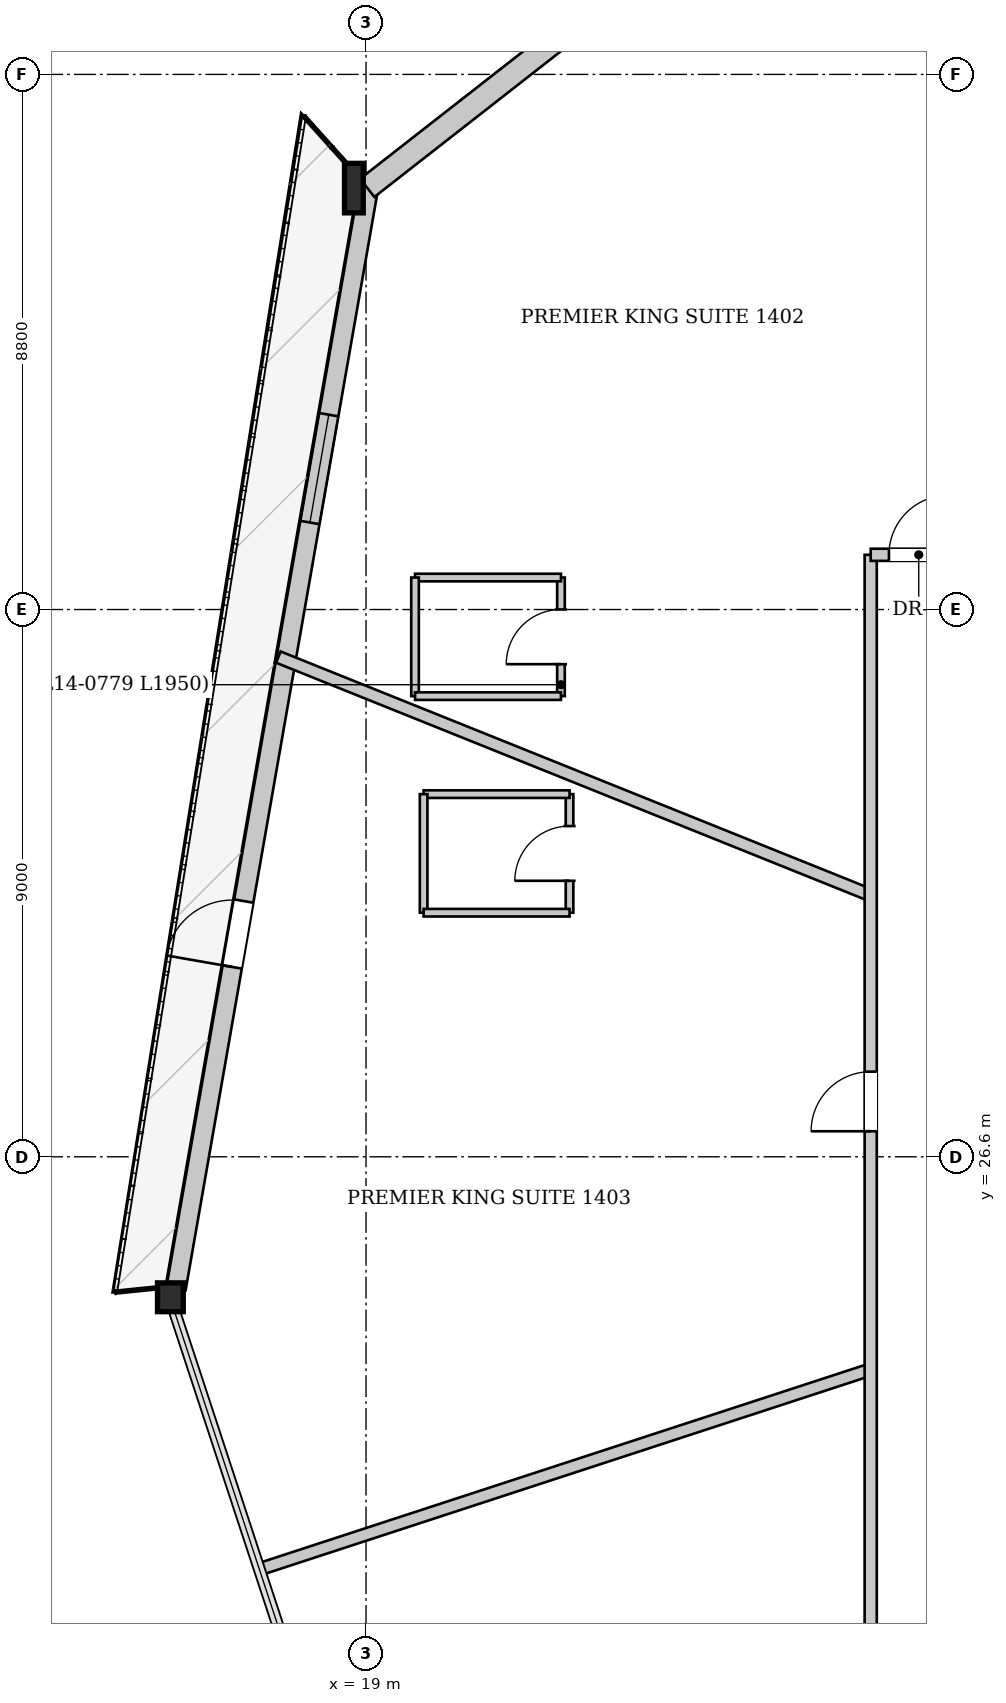
"""IFC4 building model, lengths in metres.
Left out: names, types, materials, properties, quantities, classifications, styles, units other than length and angle.
Written with IfcOpenShell. Run it as: python <this file> out.ifc"""

import sys

from ifc_helpers import new_model, si_unit, direction, frame, frame_2d, origin, origin_2d, place, context, subcontext, project, spatial, rectangle, i_section, extrude, source, transform, mapped, element, fill, save


model = new_model("IFC4")
c1 = context("Model", 3, precision=1e-05, world=origin(), true_north=direction((0.0, 1.0)))
c2 = subcontext(c1, "Body", "Model", "MODEL_VIEW")
j1 = project(units=[si_unit("LENGTHUNIT", "METRE"), si_unit("PLANEANGLEUNIT", "RADIAN")], contexts=[c1])
p1 = place(None, origin())
s1 = spatial("IfcSite", under=j1, at=p1, CompositionType="ELEMENT")
p2 = place(p1, origin())
s2 = spatial("IfcBuilding", under=s1, at=p2, CompositionType="ELEMENT")
p3 = place(p2, frame((0.0, 0.0, 57.7)))
s3 = spatial("IfcBuildingStorey", under=s2, at=p3, CompositionType="ELEMENT", Elevation=57.7)
m1 = source(origin(), c2, "Body", "SweptSolid", [
    extrude(i_section(OverallWidth=0.308, OverallDepth=0.814, WebThickness=0.021, FlangeThickness=0.04, at=origin_2d()), origin(), (0.0, 0.0, 1.0), 3.405),
])
p4 = place(p3, frame((18.903, 42.684, 0.0), z_axis=(-0.060441534737, -0.090124566031, 0.994094755784), x_axis=(0.830522417348, -0.556985201133, 0.0)))
e1 = element("IfcColumn", 1, at=p4, inside=s3, PredefinedType="COLUMN", context=c2, shape_type="MappedRepresentation", body=[
    mapped(m1, transform((0.0, 0.0, 0.0), x_axis=(1.0, 0.0, 0.0), y_axis=(0.0, 1.0, 0.0), z_axis=(0.0, 0.0, 1.0), scale=1.0)),
])
m2 = source(origin(), c2, "Body", "SweptSolid", [
    extrude(i_section(OverallWidth=0.424, OverallDepth=0.474, WebThickness=0.043, FlangeThickness=0.068, at=origin_2d()), origin(), (0.0, 0.0, 1.0), 3.405),
])
p5 = place(p3, frame((15.717, 24.46, 0.0), z_axis=(0.038221610545, -0.099892501857, 0.994263846552), x_axis=(0.933966291378, 0.357361115078, 0.0)))
e2 = element("IfcColumn", 2, at=p5, inside=s3, PredefinedType="COLUMN", context=c2, shape_type="MappedRepresentation", body=[
    mapped(m2, transform((0.0, 0.0, 0.0), x_axis=(1.0, 0.0, 0.0), y_axis=(0.0, 1.0, 0.0), z_axis=(0.0, 0.0, 1.0), scale=1.0)),
])
p6 = place(p3, frame((15.875, 24.432, 0.0), z_axis=(0.0, 0.0, 1.0), x_axis=(0.172204905353, 0.985061150677, 0.0)))
e3 = element("IfcWall", 3, at=p6, inside=s3, PredefinedType="SOLIDWALL", context=c2, shape_type="SweptSolid", body=[
    extrude(rectangle(XDim=18.5, YDim=0.32, at=frame_2d((9.25, 0.0))), origin(), (0.0, 0.0, 1.0), 2.592),
])
p7 = place(p6, frame((5.37, 0.0, 0.0)))
e4 = element("IfcOpeningElement", 4, at=p7, cuts=e3, PredefinedType="OPENING", context=c2, shape_type="SweptSolid", body=[
    extrude(rectangle(XDim=1.1, YDim=2.3, at=frame_2d((0.55, 1.15))), frame((0.0, 0.17, 0.0), z_axis=(0.0, -1.0, 0.0), x_axis=(1.0, 0.0, 0.0)), (0.0, 0.0, 1.0), 0.34),
])
p8 = place(p6, frame((12.79, 0.0, 0.272)))
e5 = element("IfcOpeningElement", 5, at=p8, cuts=e3, PredefinedType="OPENING", context=c2, shape_type="SweptSolid", body=[
    extrude(rectangle(XDim=1.8, YDim=2.2, at=frame_2d((0.9, 1.1))), frame((0.0, 0.17, 0.0), z_axis=(0.0, -1.0, 0.0), x_axis=(1.0, 0.0, 0.0)), (0.0, 0.0, 1.0), 0.34),
])
p9 = place(p3, frame((19.02, 42.534, 0.0), z_axis=(0.0, 0.0, 1.0), x_axis=(0.787974703517, 0.615707614552, 0.0)))
e6 = element("IfcWall", 6, at=p9, inside=s3, PredefinedType="SOLIDWALL", context=c2, shape_type="SweptSolid", body=[
    extrude(rectangle(XDim=6.26, YDim=0.38, at=frame_2d((3.13, 0.0))), origin(), (0.0, 0.0, 1.0), 2.592),
])
p10 = place(p3, frame((27.3, 30.901, 0.0), z_axis=(0.0, 0.0, 1.0), x_axis=(-0.927840286719, 0.372977750463, 0.0)))
e7 = element("IfcWall", 7, at=p10, inside=s3, PredefinedType="PARTITIONING", context=c2, shape_type="SweptSolid", body=[
    extrude(rectangle(XDim=10.499, YDim=0.2, at=frame_2d((5.25, 0.0))), origin(), (0.0, 0.0, 1.0), 3.3),
])
p11 = place(p3, frame((27.3, 23.103, 0.0), z_axis=(0.0, 0.0, 1.0), x_axis=(-0.95051188869, -0.310688186867, 0.0)))
e8 = element("IfcWall", 8, at=p11, inside=s3, PredefinedType="PARTITIONING", context=c2, shape_type="SweptSolid", body=[
    extrude(rectangle(XDim=10.548, YDim=0.2, at=frame_2d((5.274, 0.0))), origin(), (0.0, 0.0, 1.0), 3.3),
])
p12 = place(p3, frame((22.206, 34.176, 0.0), z_axis=(0.0, 0.0, 1.0), x_axis=(0.0, 1.0, 0.0)))
e9 = element("IfcWall", 9, at=p12, inside=s3, PredefinedType="PARTITIONING", context=c2, shape_type="SweptSolid", body=[
    extrude(rectangle(XDim=1.95, YDim=0.125, at=frame_2d((0.975, 0.0))), origin(), (0.0, 0.0, 1.0), 2.925),
])
p13 = place(p12, frame((0.525, 0.0, 0.0)))
e10 = element("IfcOpeningElement", 10, at=p13, cuts=e9, PredefinedType="OPENING", context=c2, shape_type="SweptSolid", body=[
    extrude(rectangle(XDim=0.9, YDim=2.1, at=frame_2d((0.45, 1.05))), frame((0.0, 0.073, 0.0), z_axis=(0.0, -1.0, 0.0), x_axis=(1.0, 0.0, 0.0)), (0.0, 0.0, 1.0), 0.145),
])
p14 = place(p3, frame((22.206, 36.126, 0.0), z_axis=(0.0, 0.0, 1.0), x_axis=(-1.0, 0.0, 0.0)))
e11 = element("IfcWall", 11, at=p14, inside=s3, PredefinedType="PARTITIONING", context=c2, shape_type="SweptSolid", body=[
    extrude(rectangle(XDim=2.4, YDim=0.125, at=frame_2d((1.2, 0.0))), origin(), (0.0, 0.0, 1.0), 3.3),
])
p15 = place(p3, frame((19.806, 36.126, 0.0), z_axis=(0.0, 0.0, 1.0), x_axis=(0.0, -1.0, 0.0)))
e12 = element("IfcWall", 12, at=p15, inside=s3, PredefinedType="PARTITIONING", context=c2, shape_type="SweptSolid", body=[
    extrude(rectangle(XDim=1.95, YDim=0.125, at=frame_2d((0.975, 0.0))), origin(), (0.0, 0.0, 1.0), 3.3),
])
p16 = place(p3, frame((19.806, 34.176, 0.0), z_axis=(0.0, 0.0, 1.0), x_axis=(1.0, 0.0, 0.0)))
e13 = element("IfcWall", 13, at=p16, inside=s3, PredefinedType="PARTITIONING", context=c2, shape_type="SweptSolid", body=[
    extrude(rectangle(XDim=2.4, YDim=0.125, at=frame_2d((1.2, 0.0))), origin(), (0.0, 0.0, 1.0), 3.3),
])
p17 = place(p3, frame((22.347, 30.614, 0.0), z_axis=(0.0, 0.0, 1.0), x_axis=(0.0, 1.0, 0.0)))
e14 = element("IfcWall", 14, at=p17, inside=s3, PredefinedType="PARTITIONING", context=c2, shape_type="SweptSolid", body=[
    extrude(rectangle(XDim=1.95, YDim=0.125, at=frame_2d((0.975, 0.0))), origin(), (0.0, 0.0, 1.0), 2.925),
])
p18 = place(p17, frame((0.525, 0.0, 0.0)))
e15 = element("IfcOpeningElement", 15, at=p18, cuts=e14, PredefinedType="OPENING", context=c2, shape_type="SweptSolid", body=[
    extrude(rectangle(XDim=0.9, YDim=2.1, at=frame_2d((0.45, 1.05))), frame((0.0, 0.073, 0.0), z_axis=(0.0, -1.0, 0.0), x_axis=(1.0, 0.0, 0.0)), (0.0, 0.0, 1.0), 0.145),
])
p19 = place(p3, frame((22.347, 32.564, 0.0), z_axis=(0.0, 0.0, 1.0), x_axis=(-1.0, 0.0, 0.0)))
e16 = element("IfcWall", 16, at=p19, inside=s3, PredefinedType="PARTITIONING", context=c2, shape_type="SweptSolid", body=[
    extrude(rectangle(XDim=2.4, YDim=0.125, at=frame_2d((1.2, 0.0))), origin(), (0.0, 0.0, 1.0), 3.3),
])
p20 = place(p3, frame((19.947, 32.564, 0.0), z_axis=(0.0, 0.0, 1.0), x_axis=(0.0, -1.0, 0.0)))
e17 = element("IfcWall", 17, at=p20, inside=s3, PredefinedType="PARTITIONING", context=c2, shape_type="SweptSolid", body=[
    extrude(rectangle(XDim=1.95, YDim=0.125, at=frame_2d((0.975, 0.0))), origin(), (0.0, 0.0, 1.0), 3.3),
])
p21 = place(p3, frame((19.947, 30.614, 0.0), z_axis=(0.0, 0.0, 1.0), x_axis=(1.0, 0.0, 0.0)))
e18 = element("IfcWall", 18, at=p21, inside=s3, PredefinedType="PARTITIONING", context=c2, shape_type="SweptSolid", body=[
    extrude(rectangle(XDim=2.4, YDim=0.125, at=frame_2d((1.2, 0.0))), origin(), (0.0, 0.0, 1.0), 3.3),
])
p22 = place(p3, frame((27.3, 16.7, 0.0), z_axis=(0.0, 0.0, 1.0), x_axis=(0.0, 1.0, 0.0)))
e19 = element("IfcWall", 19, at=p22, inside=s3, PredefinedType="PARTITIONING", context=c2, shape_type="SweptSolid", body=[
    extrude(rectangle(XDim=19.8, YDim=0.2, at=frame_2d((9.9, 0.0))), origin(), (0.0, 0.0, 1.0), 3.3),
])
p23 = place(p22, frame((10.32, 0.0, 0.0)))
e20 = element("IfcOpeningElement", 20, at=p23, cuts=e19, PredefinedType="OPENING", context=c2, shape_type="SweptSolid", body=[
    extrude(rectangle(XDim=0.98, YDim=2.15, at=frame_2d((0.49, 1.075))), frame((0.0, 0.11, 0.0), z_axis=(0.0, -1.0, 0.0), x_axis=(1.0, 0.0, 0.0)), (0.0, 0.0, 1.0), 0.22),
])
p24 = place(p3, frame((27.3, 36.5, 0.0), z_axis=(0.0, 0.0, 1.0), x_axis=(1.0, 0.0, 0.0)))
e21 = element("IfcWall", 21, at=p24, inside=s3, PredefinedType="PARTITIONING", context=c2, shape_type="SweptSolid", body=[
    extrude(rectangle(XDim=21.4, YDim=0.2, at=frame_2d((10.7, 0.0))), origin(), (0.0, 0.0, 1.0), 3.3),
])
p25 = place(p24, frame((20.12, 0.0, 0.0)))
e22 = element("IfcOpeningElement", 22, at=p25, cuts=e21, PredefinedType="OPENING", context=c2, shape_type="SweptSolid", body=[
    extrude(rectangle(XDim=0.98, YDim=2.15, at=frame_2d((0.49, 1.075))), frame((0.0, 0.11, 0.0), z_axis=(0.0, -1.0, 0.0), x_axis=(1.0, 0.0, 0.0)), (0.0, 0.0, 1.0), 0.22),
])
p26 = place(p24, frame((0.3, 0.0, 0.0)))
e23 = element("IfcOpeningElement", 23, at=p26, cuts=e21, PredefinedType="OPENING", context=c2, shape_type="SweptSolid", body=[
    extrude(rectangle(XDim=0.98, YDim=2.15, at=frame_2d((0.49, 1.075))), frame((0.0, 0.11, 0.0), z_axis=(0.0, -1.0, 0.0), x_axis=(1.0, 0.0, 0.0)), (0.0, 0.0, 1.0), 0.22),
])
m3 = source(origin(), c2, "Body", "SweptSolid", [
    extrude(rectangle(XDim=1.1, YDim=2.3, at=frame_2d((0.55, 1.15))), frame((0.0, 0.025, 0.0), z_axis=(0.0, -1.0, 0.0), x_axis=(1.0, 0.0, 0.0)), (0.0, 0.0, 1.0), 0.05),
])
p27 = place(p7, origin())
e24 = element("IfcDoor", 24, at=p27, inside=s3, OperationType="SINGLE_SWING_LEFT", PredefinedType="DOOR", context=c2, shape_type="MappedRepresentation", body=[
    mapped(m3, transform((0.0, 0.0, 0.0), x_axis=(1.0, 0.0, 0.0), y_axis=(0.0, 1.0, 0.0), z_axis=(0.0, 0.0, 1.0), scale=1.0)),
])
fill(e4, e24)
m4 = source(origin(), c2, "Body", "SweptSolid", [
    extrude(rectangle(XDim=1.8, YDim=2.2, at=frame_2d((0.9, 1.1))), frame((0.0, 0.03, 0.0), z_axis=(0.0, -1.0, 0.0), x_axis=(1.0, 0.0, 0.0)), (0.0, 0.0, 1.0), 0.06),
])
p28 = place(p8, origin())
e25 = element("IfcWindow", 25, at=p28, inside=s3, PartitioningType="SINGLE_PANEL", PredefinedType="WINDOW", context=c2, shape_type="MappedRepresentation", body=[
    mapped(m4, transform((0.0, 0.0, 0.0), x_axis=(1.0, 0.0, 0.0), y_axis=(0.0, 1.0, 0.0), z_axis=(0.0, 0.0, 1.0), scale=1.0)),
])
fill(e5, e25)
m5 = source(origin(), c2, "Body", "SweptSolid", [
    extrude(rectangle(XDim=0.9, YDim=2.1, at=frame_2d((0.45, 1.05))), frame((0.0, 0.025, 0.0), z_axis=(0.0, -1.0, 0.0), x_axis=(1.0, 0.0, 0.0)), (0.0, 0.0, 1.0), 0.05),
])
p29 = place(p13, origin())
e26 = element("IfcDoor", 26, at=p29, inside=s3, OperationType="SINGLE_SWING_LEFT", PredefinedType="DOOR", context=c2, shape_type="MappedRepresentation", body=[
    mapped(m5, transform((0.0, 0.0, 0.0), x_axis=(1.0, 0.0, 0.0), y_axis=(0.0, 1.0, 0.0), z_axis=(0.0, 0.0, 1.0), scale=1.0)),
])
fill(e10, e26)
p30 = place(p18, origin())
e27 = element("IfcDoor", 27, at=p30, inside=s3, OperationType="SINGLE_SWING_LEFT", PredefinedType="DOOR", context=c2, shape_type="MappedRepresentation", body=[
    mapped(m5, transform((0.0, 0.0, 0.0), x_axis=(1.0, 0.0, 0.0), y_axis=(0.0, 1.0, 0.0), z_axis=(0.0, 0.0, 1.0), scale=1.0)),
])
fill(e15, e27)
m6 = source(origin(), c2, "Body", "SweptSolid", [
    extrude(rectangle(XDim=0.98, YDim=2.15, at=frame_2d((0.49, 1.075))), frame((0.0, 0.025, 0.0), z_axis=(0.0, -1.0, 0.0), x_axis=(1.0, 0.0, 0.0)), (0.0, 0.0, 1.0), 0.05),
])
p31 = place(p23, origin())
e28 = element("IfcDoor", 28, at=p31, inside=s3, OperationType="SINGLE_SWING_LEFT", PredefinedType="DOOR", context=c2, shape_type="MappedRepresentation", body=[
    mapped(m6, transform((0.0, 0.0, 0.0), x_axis=(1.0, 0.0, 0.0), y_axis=(0.0, 1.0, 0.0), z_axis=(0.0, 0.0, 1.0), scale=1.0)),
])
fill(e20, e28)
p32 = place(p26, origin())
e29 = element("IfcDoor", 29, at=p32, inside=s3, OperationType="SINGLE_SWING_RIGHT", PredefinedType="DOOR", context=c2, shape_type="MappedRepresentation", body=[
    mapped(m6, transform((0.0, 0.0, 0.0), x_axis=(1.0, 0.0, 0.0), y_axis=(0.0, 1.0, 0.0), z_axis=(0.0, 0.0, 1.0), scale=1.0)),
])
fill(e23, e29)
save(model, sys.argv[1])
